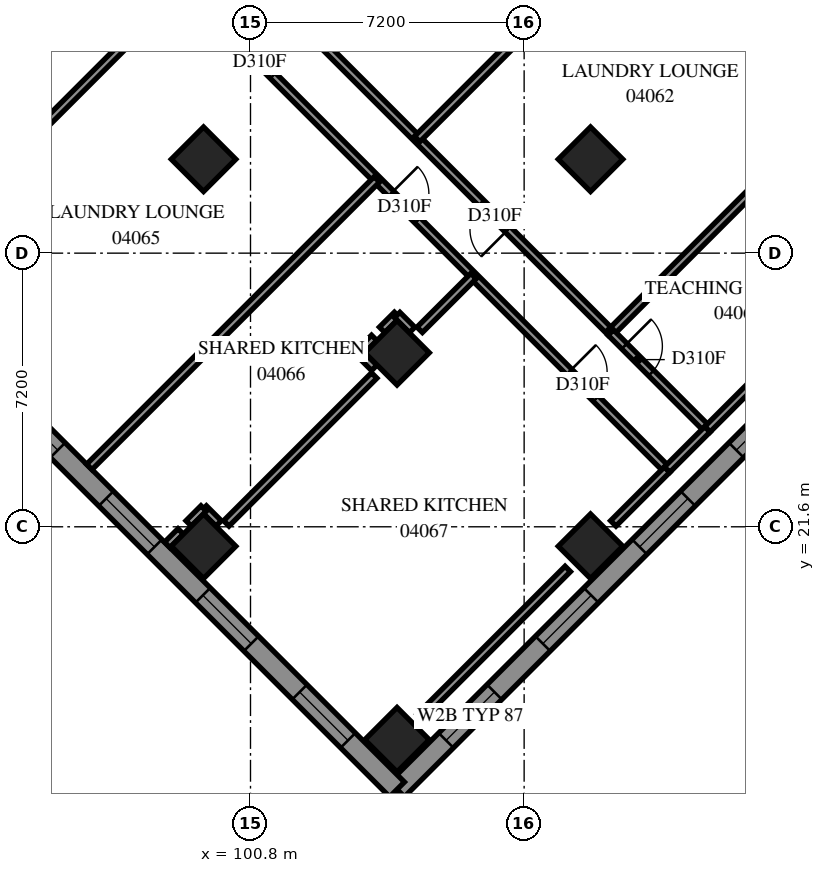
"""IFC4 building model, lengths in metres.
Left out: names, types, materials, properties, quantities, classifications, styles, units other than length and angle.
Written with IfcOpenShell. Run it as: python <this file> out.ifc"""

import sys

from ifc_helpers import new_model, si_unit, direction, frame, frame_2d, origin, origin_2d, place, context, subcontext, project, spatial, polyline, rectangle, outline, extrude, element, fill, save


model = new_model("IFC4")
c1 = context("Model", 3, precision=1e-05, world=origin(), true_north=direction((0.0, 1.0)))
c2 = subcontext(c1, "Body", "Model", "MODEL_VIEW")
j1 = project(units=[si_unit("LENGTHUNIT", "METRE"), si_unit("PLANEANGLEUNIT", "RADIAN")], contexts=[c1])
p1 = place(None, origin())
s1 = spatial("IfcSite", under=j1, at=p1, CompositionType="ELEMENT")
p2 = place(p1, origin())
s2 = spatial("IfcBuilding", under=s1, at=p2, CompositionType="ELEMENT")
p3 = place(p2, frame((0.0, 0.0, 18.6)))
s3 = spatial("IfcBuildingStorey", under=s2, at=p3, CompositionType="ELEMENT", Elevation=18.6)
for number, where, z_axis, x_axis in (
    (1, (99.565, 31.271, 0.0), (0.0, 0.0, 1.0), (0.707, -0.707, 0.0)),
    (2, (109.747, 31.271, 0.0), (0.0, 0.0, 1.0), (0.707, -0.707, 0.0)),
    (3, (104.656, 26.18, 0.0), (0.0, 0.0, 1.0), (0.707, -0.707, 0.0)),
    (4, (99.565, 21.088, 0.0), (0.0, 0.0, 1.0), (0.707, -0.707, 0.0)),
    (5, (109.747, 21.088, 0.0), (0.0, 0.0, 1.0), (0.707, -0.707, 0.0)),
    (6, (104.656, 15.997, 0.0), (0.0, 0.0, 1.0), (0.707, -0.707, 0.0)),
):
    element("IfcColumn", number, at=place(p3, frame(where, z_axis=z_axis, x_axis=x_axis)), inside=s3, PredefinedType="COLUMN", context=c2, shape_type="SweptSolid", body=[
        extrude(rectangle(XDim=1.2, YDim=1.2, at=origin_2d()), origin(), (0.0, 0.0, 1.0), 3.8),
    ])
p4 = place(p3, frame((104.656, 14.689, 0.0), z_axis=(0.0, 0.0, 1.0), x_axis=(0.7071094621, 0.7071041002, 0.0)))
e7 = element("IfcWall", 7, at=p4, inside=s3, PredefinedType="SOLIDWALL", context=c2, shape_type="SweptSolid", body=[
    extrude(outline(polyline([(-0.275, -0.275), (18.925, -0.275), (18.375, 0.275), (0.275, 0.275), (-0.275, -0.275)])), origin(), (0.0, 0.0, 1.0), 3.8),
])
p5 = place(p4, frame((1.825, 0.0, 0.7)))
e8 = element("IfcOpeningElement", 8, at=p5, cuts=e7, PredefinedType="OPENING", context=c2, shape_type="SweptSolid", body=[
    extrude(rectangle(XDim=1.8, YDim=2.4, at=frame_2d((0.9, 1.2))), frame((0.0, 0.285, 0.0), z_axis=(0.0, -1.0, 0.0), x_axis=(1.0, 0.0, 0.0)), (0.0, 0.0, 1.0), 0.57),
])
p6 = place(p4, frame((5.425, 0.0, 0.7)))
e9 = element("IfcOpeningElement", 9, at=p6, cuts=e7, PredefinedType="OPENING", context=c2, shape_type="SweptSolid", body=[
    extrude(rectangle(XDim=1.8, YDim=2.4, at=frame_2d((0.9, 1.2))), frame((0.0, 0.285, 0.0), z_axis=(0.0, -1.0, 0.0), x_axis=(1.0, 0.0, 0.0)), (0.0, 0.0, 1.0), 0.57),
])
p7 = place(p4, frame((9.025, 0.0, 0.7)))
e10 = element("IfcOpeningElement", 10, at=p7, cuts=e7, PredefinedType="OPENING", context=c2, shape_type="SweptSolid", body=[
    extrude(rectangle(XDim=1.8, YDim=2.4, at=frame_2d((0.9, 1.2))), frame((0.0, 0.285, 0.0), z_axis=(0.0, -1.0, 0.0), x_axis=(1.0, 0.0, 0.0)), (0.0, 0.0, 1.0), 0.57),
])
p8 = place(p4, frame((12.625, 0.0, 0.7)))
e11 = element("IfcOpeningElement", 11, at=p8, cuts=e7, PredefinedType="OPENING", context=c2, shape_type="SweptSolid", body=[
    extrude(rectangle(XDim=1.8, YDim=2.4, at=frame_2d((0.9, 1.2))), frame((0.0, 0.285, 0.0), z_axis=(0.0, -1.0, 0.0), x_axis=(1.0, 0.0, 0.0)), (0.0, 0.0, 1.0), 0.57),
])
p9 = place(p4, frame((16.05, 0.0, 0.7)))
e12 = element("IfcOpeningElement", 12, at=p9, cuts=e7, PredefinedType="OPENING", context=c2, shape_type="SweptSolid", body=[
    extrude(rectangle(XDim=1.8, YDim=2.4, at=frame_2d((0.9, 1.2))), frame((0.0, 0.285, 0.0), z_axis=(0.0, -1.0, 0.0), x_axis=(1.0, 0.0, 0.0)), (0.0, 0.0, 1.0), 0.57),
])
p10 = place(p3, frame((77.07, 42.275, 0.0), z_axis=(0.0, 0.0, 1.0), x_axis=(0.7071067812, -0.7071067812, 0.0)))
e13 = element("IfcWall", 13, at=p10, inside=s3, PredefinedType="SOLIDWALL", context=c2, shape_type="SweptSolid", body=[
    extrude(outline(polyline([(0.114, -0.275), (39.288, -0.275), (38.737, 0.275), (-0.114, 0.275), (0.114, -0.275)])), origin(), (0.0, 0.0, 1.0), 3.8),
])
p11 = place(p10, frame((2.837, 0.0, 0.7)))
e14 = element("IfcOpeningElement", 14, at=p11, cuts=e13, PredefinedType="OPENING", context=c2, shape_type="SweptSolid", body=[
    extrude(rectangle(XDim=1.8, YDim=2.4, at=frame_2d((0.9, 1.2))), frame((0.0, 0.285, 0.0), z_axis=(0.0, -1.0, 0.0), x_axis=(1.0, 0.0, 0.0)), (0.0, 0.0, 1.0), 0.57),
])
p12 = place(p10, frame((6.588, 0.0, 0.7)))
e15 = element("IfcOpeningElement", 15, at=p12, cuts=e13, PredefinedType="OPENING", context=c2, shape_type="SweptSolid", body=[
    extrude(rectangle(XDim=1.8, YDim=2.4, at=frame_2d((0.9, 1.2))), frame((0.0, 0.285, 0.0), z_axis=(0.0, -1.0, 0.0), x_axis=(1.0, 0.0, 0.0)), (0.0, 0.0, 1.0), 0.57),
])
p13 = place(p10, frame((10.188, 0.0, 0.7)))
e16 = element("IfcOpeningElement", 16, at=p13, cuts=e13, PredefinedType="OPENING", context=c2, shape_type="SweptSolid", body=[
    extrude(rectangle(XDim=1.8, YDim=2.4, at=frame_2d((0.9, 1.2))), frame((0.0, 0.285, 0.0), z_axis=(0.0, -1.0, 0.0), x_axis=(1.0, 0.0, 0.0)), (0.0, 0.0, 1.0), 0.57),
])
p14 = place(p10, frame((13.787, 0.0, 0.7)))
e17 = element("IfcOpeningElement", 17, at=p14, cuts=e13, PredefinedType="OPENING", context=c2, shape_type="SweptSolid", body=[
    extrude(rectangle(XDim=1.8, YDim=2.4, at=frame_2d((0.9, 1.2))), frame((0.0, 0.285, 0.0), z_axis=(0.0, -1.0, 0.0), x_axis=(1.0, 0.0, 0.0)), (0.0, 0.0, 1.0), 0.57),
])
p15 = place(p10, frame((17.387, 0.0, 0.7)))
e18 = element("IfcOpeningElement", 18, at=p15, cuts=e13, PredefinedType="OPENING", context=c2, shape_type="SweptSolid", body=[
    extrude(rectangle(XDim=1.8, YDim=2.4, at=frame_2d((0.9, 1.2))), frame((0.0, 0.285, 0.0), z_axis=(0.0, -1.0, 0.0), x_axis=(1.0, 0.0, 0.0)), (0.0, 0.0, 1.0), 0.57),
])
p16 = place(p10, frame((20.988, 0.0, 0.7)))
e19 = element("IfcOpeningElement", 19, at=p16, cuts=e13, PredefinedType="OPENING", context=c2, shape_type="SweptSolid", body=[
    extrude(rectangle(XDim=1.8, YDim=2.4, at=frame_2d((0.9, 1.2))), frame((0.0, 0.285, 0.0), z_axis=(0.0, -1.0, 0.0), x_axis=(1.0, 0.0, 0.0)), (0.0, 0.0, 1.0), 0.57),
])
p17 = place(p10, frame((24.587, 0.0, 0.7)))
e20 = element("IfcOpeningElement", 20, at=p17, cuts=e13, PredefinedType="OPENING", context=c2, shape_type="SweptSolid", body=[
    extrude(rectangle(XDim=1.8, YDim=2.4, at=frame_2d((0.9, 1.2))), frame((0.0, 0.285, 0.0), z_axis=(0.0, -1.0, 0.0), x_axis=(1.0, 0.0, 0.0)), (0.0, 0.0, 1.0), 0.57),
])
p18 = place(p10, frame((28.188, 0.0, 0.7)))
e21 = element("IfcOpeningElement", 21, at=p18, cuts=e13, PredefinedType="OPENING", context=c2, shape_type="SweptSolid", body=[
    extrude(rectangle(XDim=1.8, YDim=2.4, at=frame_2d((0.9, 1.2))), frame((0.0, 0.285, 0.0), z_axis=(0.0, -1.0, 0.0), x_axis=(1.0, 0.0, 0.0)), (0.0, 0.0, 1.0), 0.57),
])
p19 = place(p10, frame((31.788, 0.0, 0.7)))
e22 = element("IfcOpeningElement", 22, at=p19, cuts=e13, PredefinedType="OPENING", context=c2, shape_type="SweptSolid", body=[
    extrude(rectangle(XDim=1.8, YDim=2.4, at=frame_2d((0.9, 1.2))), frame((0.0, 0.285, 0.0), z_axis=(0.0, -1.0, 0.0), x_axis=(1.0, 0.0, 0.0)), (0.0, 0.0, 1.0), 0.57),
])
p20 = place(p10, frame((35.388, 0.0, 0.7)))
e23 = element("IfcOpeningElement", 23, at=p20, cuts=e13, PredefinedType="OPENING", context=c2, shape_type="SweptSolid", body=[
    extrude(rectangle(XDim=1.8, YDim=2.4, at=frame_2d((0.9, 1.2))), frame((0.0, 0.285, 0.0), z_axis=(0.0, -1.0, 0.0), x_axis=(1.0, 0.0, 0.0)), (0.0, 0.0, 1.0), 0.57),
])
p21 = place(p3, frame((93.163, 41.697, 0.0), z_axis=(0.0, 0.0, 1.0), x_axis=(0.7071067812, -0.7071067812, 0.0)))
e24 = element("IfcWall", 24, at=p21, inside=s3, PredefinedType="PARTITIONING", context=c2, shape_type="SweptSolid", body=[
    extrude(rectangle(XDim=26.299, YDim=0.2, at=frame_2d((13.149, 0.0))), origin(), (0.0, 0.0, 1.0), 3.8),
])
p22 = place(p21, frame((3.437, 0.0, 0.0)))
e25 = element("IfcOpeningElement", 25, at=p22, cuts=e24, PredefinedType="OPENING", context=c2, shape_type="SweptSolid", body=[
    extrude(rectangle(XDim=1.0, YDim=2.1, at=frame_2d((0.5, 1.05))), frame((0.0, 0.11, 0.0), z_axis=(0.0, -1.0, 0.0), x_axis=(1.0, 0.0, 0.0)), (0.0, 0.0, 1.0), 0.22),
])
p23 = place(p21, frame((10.637, 0.0, 0.0)))
e26 = element("IfcOpeningElement", 26, at=p23, cuts=e24, PredefinedType="OPENING", context=c2, shape_type="SweptSolid", body=[
    extrude(rectangle(XDim=1.0, YDim=2.1, at=frame_2d((0.5, 1.05))), frame((0.0, 0.11, 0.0), z_axis=(0.0, -1.0, 0.0), x_axis=(1.0, 0.0, 0.0)), (0.0, 0.0, 1.0), 0.22),
])
p24 = place(p21, frame((16.024, 0.0, 0.0)))
e27 = element("IfcOpeningElement", 27, at=p24, cuts=e24, PredefinedType="OPENING", context=c2, shape_type="SweptSolid", body=[
    extrude(rectangle(XDim=1.0, YDim=2.1, at=frame_2d((0.5, 1.05))), frame((0.0, 0.11, 0.0), z_axis=(0.0, -1.0, 0.0), x_axis=(1.0, 0.0, 0.0)), (0.0, 0.0, 1.0), 0.22),
])
p25 = place(p21, frame((22.657, 0.0, 0.0)))
e28 = element("IfcOpeningElement", 28, at=p25, cuts=e24, PredefinedType="OPENING", context=c2, shape_type="SweptSolid", body=[
    extrude(rectangle(XDim=1.0, YDim=2.1, at=frame_2d((0.5, 1.05))), frame((0.0, 0.11, 0.0), z_axis=(0.0, -1.0, 0.0), x_axis=(1.0, 0.0, 0.0)), (0.0, 0.0, 1.0), 0.22),
])
p26 = place(p3, frame((110.281, 26.713, 0.0), z_axis=(0.0, 0.0, 1.0), x_axis=(-0.7072363947, 0.7069771439, 0.0)))
e29 = element("IfcWall", 29, at=p26, inside=s3, PredefinedType="PARTITIONING", context=c2, shape_type="SweptSolid", body=[
    extrude(rectangle(XDim=10.8, YDim=0.2, at=frame_2d((5.4, 0.0))), origin(), (0.0, 0.0, 1.0), 3.8),
])
p27 = place(p26, frame((3.827, 0.0, 0.0)))
e30 = element("IfcOpeningElement", 30, at=p27, cuts=e29, PredefinedType="OPENING", context=c2, shape_type="SweptSolid", body=[
    extrude(rectangle(XDim=1.0, YDim=2.1, at=frame_2d((0.5, 1.05))), frame((0.0, 0.11, 0.0), z_axis=(0.0, -1.0, 0.0), x_axis=(1.0, 0.0, 0.0)), (0.0, 0.0, 1.0), 0.22),
])
p28 = place(p3, frame((96.559, 23.175, 0.0), z_axis=(0.0, 0.0, 1.0), x_axis=(0.707111454, 0.7071021083, 0.0)))
e31 = element("IfcWall", 31, at=p28, inside=s3, PredefinedType="PARTITIONING", context=c2, shape_type="SweptSolid", body=[
    extrude(rectangle(XDim=10.7, YDim=0.2, at=frame_2d((5.35, 0.0))), origin(), (0.0, 0.0, 1.0), 3.8),
])
p29 = place(p3, frame((91.468, 28.266, 0.0), z_axis=(0.0, 0.0, 1.0), x_axis=(0.7071067812, 0.7071067812, 0.0)))
e32 = element("IfcWall", 32, at=p29, inside=s3, PredefinedType="PARTITIONING", context=c2, shape_type="SweptSolid", body=[
    extrude(rectangle(XDim=10.7, YDim=0.2, at=frame_2d((5.35, 0.0))), origin(), (0.0, 0.0, 1.0), 3.8),
])
p30 = place(p3, frame((105.186, 31.802, 0.0), z_axis=(0.0, 0.0, 1.0), x_axis=(0.707102108, 0.7071114543, 0.0)))
e33 = element("IfcWall", 33, at=p30, inside=s3, PredefinedType="PARTITIONING", context=c2, shape_type="SweptSolid", body=[
    extrude(rectangle(XDim=10.699, YDim=0.2, at=frame_2d((5.35, 0.0))), origin(), (0.0, 0.0, 1.0), 3.8),
])
p31 = place(p3, frame((110.277, 26.711, 0.0), z_axis=(0.0, 0.0, 1.0), x_axis=(0.7071067812, 0.7071067812, 0.0)))
e34 = element("IfcWall", 34, at=p31, inside=s3, PredefinedType="PARTITIONING", context=c2, shape_type="SweptSolid", body=[
    extrude(rectangle(XDim=5.899, YDim=0.2, at=frame_2d((2.95, 0.0))), origin(), (0.0, 0.0, 1.0), 3.8),
])
p32 = place(p3, frame((105.255, 16.599, 0.0), z_axis=(0.0, 0.0, 1.0), x_axis=(0.7071067812, 0.7071067812, 0.0)))
e35 = element("IfcWall", 35, at=p32, inside=s3, PredefinedType="PARTITIONING", context=c2, shape_type="SweptSolid", body=[
    extrude(rectangle(XDim=5.504, YDim=0.2, at=frame_2d((2.752, 0.0))), origin(), (0.0, 0.0, 1.0), 3.2),
])
p33 = place(p3, frame((100.163, 21.689, 0.0), z_axis=(0.0, 0.0, 1.0), x_axis=(0.7071067812, 0.7071067812, 0.0)))
e36 = element("IfcWall", 36, at=p33, inside=s3, PredefinedType="PARTITIONING", context=c2, shape_type="SweptSolid", body=[
    extrude(rectangle(XDim=5.504, YDim=0.2, at=frame_2d((2.752, 0.0))), origin(), (0.0, 0.0, 1.0), 3.8),
])
p34 = place(p3, frame((110.279, 26.711, 0.0), z_axis=(0.0, 0.0, 1.0), x_axis=(0.7068288851, -0.7073845681, 0.0)))
e37 = element("IfcWall", 37, at=p34, inside=s3, PredefinedType="PARTITIONING", context=c2, shape_type="SweptSolid", body=[
    extrude(rectangle(XDim=3.599, YDim=0.2, at=frame_2d((1.8, 0.0))), origin(), (0.0, 0.0, 1.0), 3.8),
])
p35 = place(p34, frame((0.507, 0.0, 0.0)))
e38 = element("IfcOpeningElement", 38, at=p35, cuts=e37, PredefinedType="OPENING", context=c2, shape_type="SweptSolid", body=[
    extrude(rectangle(XDim=1.0, YDim=2.1, at=frame_2d((0.5, 1.05))), frame((0.0, 0.11, 0.0), z_axis=(0.0, -1.0, 0.0), x_axis=(1.0, 0.0, 0.0)), (0.0, 0.0, 1.0), 0.22),
])
for number, where, z_axis, x_axis in (
    (39, (110.346, 21.689, 0.0), (0.0, 0.0, 1.0), (0.707, 0.707, 0.0)),
    (40, (112.822, 24.165, 0.0), (0.0, 0.0, 1.0), (0.707, 0.707, 0.0)),
):
    element("IfcWall", number, at=place(p3, frame(where, z_axis=z_axis, x_axis=x_axis)), inside=s3, PredefinedType="PARTITIONING", context=c2, shape_type="SweptSolid", body=[
        extrude(rectangle(XDim=2.002, YDim=0.2, at=frame_2d((1.001, 0.0))), origin(), (0.0, 0.0, 1.0), 3.2),
    ])
p36 = place(p3, frame((105.252, 26.784, 0.0), z_axis=(0.0, 0.0, 1.0), x_axis=(0.7076063266, 0.7066068826, 0.0)))
e41 = element("IfcWall", 41, at=p36, inside=s3, PredefinedType="PARTITIONING", context=c2, shape_type="SweptSolid", body=[
    extrude(rectangle(XDim=2.001, YDim=0.2, at=frame_2d((1.001, 0.0))), origin(), (0.0, 0.0, 1.0), 3.8),
])
p37 = place(p3, frame((111.761, 23.105, 0.0), z_axis=(0.0, 0.0, 1.0), x_axis=(0.7071067812, 0.7071067812, 0.0)))
e42 = element("IfcWall", 42, at=p37, inside=s3, PredefinedType="PARTITIONING", context=c2, shape_type="SweptSolid", body=[
    extrude(rectangle(XDim=1.499, YDim=0.2, at=frame_2d((0.75, 0.0))), origin(), (0.0, 0.0, 1.0), 3.2),
])
for number, where, z_axis, x_axis in (
    (43, (99.568, 22.082, 0.0), (0.0, 0.0, 1.0), (0.707, -0.707, 0.0)),
    (44, (99.173, 21.689, 0.0), (0.0, 0.0, 1.0), (0.707, 0.707, 0.0)),
    (45, (103.661, 26.177, 0.0), (0.0, 0.0, 1.0), (0.707, 0.707, 0.0)),
    (46, (103.662, 26.177, 0.0), (0.0, 0.0, 1.0), (0.707, -0.707, 0.0)),
):
    element("IfcWall", number, at=place(p3, frame(where, z_axis=z_axis, x_axis=x_axis)), inside=s3, PredefinedType="PARTITIONING", context=c2, shape_type="SweptSolid", body=[
        extrude(rectangle(XDim=0.557, YDim=0.2, at=frame_2d((0.279, 0.0))), origin(), (0.0, 0.0, 1.0), 3.8),
    ])
p38 = place(p3, frame((104.263, 26.784, 0.0), z_axis=(0.0, 0.0, 1.0), x_axis=(0.7089037401, 0.705305244, 0.0)))
e47 = element("IfcWall", 47, at=p38, inside=s3, PredefinedType="PARTITIONING", context=c2, shape_type="SweptSolid", body=[
    extrude(rectangle(XDim=0.556, YDim=0.2, at=frame_2d((0.278, 0.0))), origin(), (0.0, 0.0, 1.0), 3.8),
])
p39 = place(p3, frame((104.66, 27.172, 0.0), z_axis=(0.0, 0.0, 1.0), x_axis=(0.7071067812, -0.7071067812, 0.0)))
e48 = element("IfcWall", 48, at=p39, inside=s3, PredefinedType="PARTITIONING", context=c2, shape_type="SweptSolid", body=[
    extrude(rectangle(XDim=0.554, YDim=0.2, at=frame_2d((0.277, 0.0))), origin(), (0.0, 0.0, 1.0), 3.8),
])
p40 = place(p3, frame((98.609, 21.125, 0.0), z_axis=(0.0, 0.0, 1.0), x_axis=(0.7072066057, 0.7070069426, 0.0)))
e49 = element("IfcWall", 49, at=p40, inside=s3, PredefinedType="PARTITIONING", context=c2, shape_type="SweptSolid", body=[
    extrude(rectangle(XDim=0.501, YDim=0.2, at=frame_2d((0.25, 0.0))), origin(), (0.0, 0.0, 1.0), 3.8),
])
p41 = place(p5, origin())
e50 = element("IfcWindow", 50, at=p41, inside=s3, PartitioningType="SINGLE_PANEL", PredefinedType="WINDOW", context=c2, shape_type="SweptSolid", body=[
    extrude(rectangle(XDim=1.8, YDim=2.4, at=frame_2d((0.9, 1.2))), frame((0.0, 0.155, 0.0), z_axis=(0.0, -1.0, 0.0), x_axis=(1.0, 0.0, 0.0)), (0.0, 0.0, 1.0), 0.06),
])
fill(e8, e50)
p42 = place(p6, origin())
e51 = element("IfcWindow", 51, at=p42, inside=s3, PartitioningType="SINGLE_PANEL", PredefinedType="WINDOW", context=c2, shape_type="SweptSolid", body=[
    extrude(rectangle(XDim=1.8, YDim=2.4, at=frame_2d((0.9, 1.2))), frame((0.0, 0.155, 0.0), z_axis=(0.0, -1.0, 0.0), x_axis=(1.0, 0.0, 0.0)), (0.0, 0.0, 1.0), 0.06),
])
fill(e9, e51)
p43 = place(p7, origin())
e52 = element("IfcWindow", 52, at=p43, inside=s3, PartitioningType="SINGLE_PANEL", PredefinedType="WINDOW", context=c2, shape_type="SweptSolid", body=[
    extrude(rectangle(XDim=1.8, YDim=2.4, at=frame_2d((0.9, 1.2))), frame((0.0, 0.155, 0.0), z_axis=(0.0, -1.0, 0.0), x_axis=(1.0, 0.0, 0.0)), (0.0, 0.0, 1.0), 0.06),
])
fill(e10, e52)
p44 = place(p8, origin())
e53 = element("IfcWindow", 53, at=p44, inside=s3, PartitioningType="SINGLE_PANEL", PredefinedType="WINDOW", context=c2, shape_type="SweptSolid", body=[
    extrude(rectangle(XDim=1.8, YDim=2.4, at=frame_2d((0.9, 1.2))), frame((0.0, 0.155, 0.0), z_axis=(0.0, -1.0, 0.0), x_axis=(1.0, 0.0, 0.0)), (0.0, 0.0, 1.0), 0.06),
])
fill(e11, e53)
p45 = place(p17, origin())
e54 = element("IfcWindow", 54, at=p45, inside=s3, PartitioningType="SINGLE_PANEL", PredefinedType="WINDOW", context=c2, shape_type="SweptSolid", body=[
    extrude(rectangle(XDim=1.8, YDim=2.4, at=frame_2d((0.9, 1.2))), frame((0.0, 0.155, 0.0), z_axis=(0.0, -1.0, 0.0), x_axis=(1.0, 0.0, 0.0)), (0.0, 0.0, 1.0), 0.06),
])
fill(e20, e54)
p46 = place(p18, origin())
e55 = element("IfcWindow", 55, at=p46, inside=s3, PartitioningType="SINGLE_PANEL", PredefinedType="WINDOW", context=c2, shape_type="SweptSolid", body=[
    extrude(rectangle(XDim=1.8, YDim=2.4, at=frame_2d((0.9, 1.2))), frame((0.0, 0.155, 0.0), z_axis=(0.0, -1.0, 0.0), x_axis=(1.0, 0.0, 0.0)), (0.0, 0.0, 1.0), 0.06),
])
fill(e21, e55)
p47 = place(p19, origin())
e56 = element("IfcWindow", 56, at=p47, inside=s3, PartitioningType="SINGLE_PANEL", PredefinedType="WINDOW", context=c2, shape_type="SweptSolid", body=[
    extrude(rectangle(XDim=1.8, YDim=2.4, at=frame_2d((0.9, 1.2))), frame((0.0, 0.155, 0.0), z_axis=(0.0, -1.0, 0.0), x_axis=(1.0, 0.0, 0.0)), (0.0, 0.0, 1.0), 0.06),
])
fill(e22, e56)
p48 = place(p20, origin())
e57 = element("IfcWindow", 57, at=p48, inside=s3, PartitioningType="SINGLE_PANEL", PredefinedType="WINDOW", context=c2, shape_type="SweptSolid", body=[
    extrude(rectangle(XDim=1.8, YDim=2.4, at=frame_2d((0.9, 1.2))), frame((0.0, 0.155, 0.0), z_axis=(0.0, -1.0, 0.0), x_axis=(1.0, 0.0, 0.0)), (0.0, 0.0, 1.0), 0.06),
])
fill(e23, e57)
p49 = place(p27, origin())
e58 = element("IfcDoor", 58, at=p49, inside=s3, OperationType="SINGLE_SWING_RIGHT", PredefinedType="DOOR", context=c2, shape_type="SweptSolid", body=[
    extrude(rectangle(XDim=1.0, YDim=2.1, at=frame_2d((0.5, 1.05))), frame((0.0, 0.025, 0.0), z_axis=(0.0, -1.0, 0.0), x_axis=(1.0, 0.0, 0.0)), (0.0, 0.0, 1.0), 0.05),
])
fill(e30, e58)
p50 = place(p23, origin())
e59 = element("IfcDoor", 59, at=p50, inside=s3, OperationType="SINGLE_SWING_LEFT", PredefinedType="DOOR", context=c2, shape_type="SweptSolid", body=[
    extrude(rectangle(XDim=1.0, YDim=2.1, at=frame_2d((0.5, 1.05))), frame((0.0, 0.025, 0.0), z_axis=(0.0, -1.0, 0.0), x_axis=(1.0, 0.0, 0.0)), (0.0, 0.0, 1.0), 0.05),
])
fill(e26, e59)
p51 = place(p24, origin())
e60 = element("IfcDoor", 60, at=p51, inside=s3, OperationType="SINGLE_SWING_LEFT", PredefinedType="DOOR", context=c2, shape_type="SweptSolid", body=[
    extrude(rectangle(XDim=1.0, YDim=2.1, at=frame_2d((0.5, 1.05))), frame((0.0, 0.025, 0.0), z_axis=(0.0, -1.0, 0.0), x_axis=(1.0, 0.0, 0.0)), (0.0, 0.0, 1.0), 0.05),
])
fill(e27, e60)
p52 = place(p25, origin())
e61 = element("IfcDoor", 61, at=p52, inside=s3, OperationType="SINGLE_SWING_RIGHT", PredefinedType="DOOR", context=c2, shape_type="SweptSolid", body=[
    extrude(rectangle(XDim=1.0, YDim=2.1, at=frame_2d((0.5, 1.05))), frame((0.0, 0.025, 0.0), z_axis=(0.0, -1.0, 0.0), x_axis=(1.0, 0.0, 0.0)), (0.0, 0.0, 1.0), 0.05),
])
fill(e28, e61)
p53 = place(p35, origin())
e62 = element("IfcDoor", 62, at=p53, inside=s3, OperationType="SINGLE_SWING_RIGHT", PredefinedType="DOOR", context=c2, shape_type="SweptSolid", body=[
    extrude(rectangle(XDim=1.0, YDim=2.1, at=frame_2d((0.5, 1.05))), frame((0.0, 0.025, 0.0), z_axis=(0.0, -1.0, 0.0), x_axis=(1.0, 0.0, 0.0)), (0.0, 0.0, 1.0), 0.05),
])
fill(e38, e62)
save(model, sys.argv[1])
